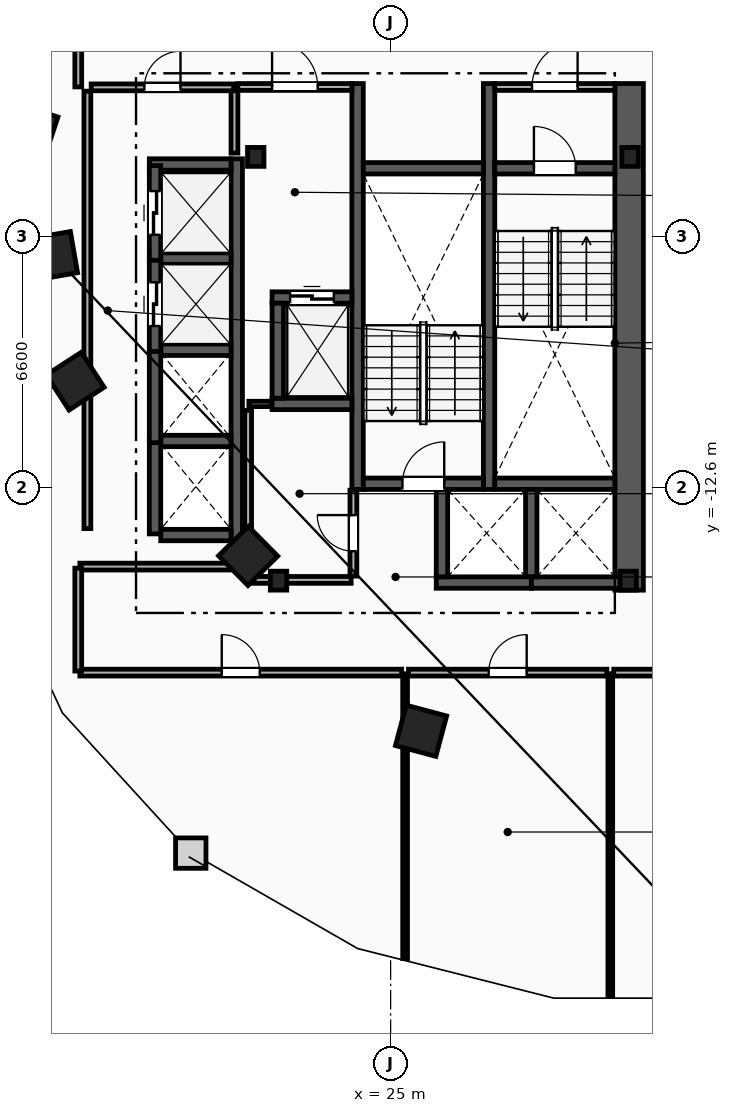
"""IFC4 building model, lengths in metres.
Left out: names, types, materials, properties, quantities, classifications, styles, units other than length and angle.
Written with IfcOpenShell. Run it as: python <this file> out.ifc"""

import sys

from ifc_helpers import new_model, si_unit, direction, frame, frame_2d, origin, origin_2d, place, context, subcontext, project, spatial, rectangle, i_section, extrude, element, fill, save


model = new_model("IFC4")
c1 = context("Model", 3, precision=1e-05, world=origin(), true_north=direction((0.0, 1.0)))
c2 = subcontext(c1, "Body", "Model", "MODEL_VIEW")
j1 = project(units=[si_unit("LENGTHUNIT", "METRE"), si_unit("PLANEANGLEUNIT", "RADIAN")], contexts=[c1])
p1 = place(None, origin())
s1 = spatial("IfcSite", under=j1, at=p1, CompositionType="ELEMENT")
p2 = place(p1, origin())
s2 = spatial("IfcBuilding", under=s1, at=p2, CompositionType="ELEMENT")
p3 = place(p2, frame((0.0, 0.0, 128.6)))
s3 = spatial("IfcBuildingStorey", under=s2, at=p3, CompositionType="ELEMENT", Elevation=128.6)
for number, where, z_axis, x_axis in (
    (1, (31.3, -3.9, 0.0), (0.0, 0.0, 1.0), (1.0, 0.0, 0.0)),
    (2, (21.45, -3.9, 0.0), (0.0, 0.0, 1.0), (1.0, 0.0, 0.0)),
    (3, (22.05, -15.05, 0.0), (0.0, 0.0, 1.0), (1.0, 0.0, 0.0)),
    (4, (31.25, -15.05, 0.0), (0.0, 0.0, 1.0), (1.0, 0.0, 0.0)),
):
    element("IfcColumn", number, at=place(p3, frame(where, z_axis=z_axis, x_axis=x_axis)), inside=s3, PredefinedType="COLUMN", context=c2, shape_type="SweptSolid", body=[
        extrude(i_section(OverallWidth=0.432, OverallDepth=0.498, WebThickness=0.056, FlangeThickness=0.089, FilletRadius=0.018, at=origin_2d()), origin(), (0.0, 0.0, 1.0), 3.6),
    ])
for number, where, z_axis, x_axis in (
    (5, (15.55, -3.2, 0.0), (0.0, 0.0, 1.0), (-0.315, -0.949, 0.0)),
    (6, (16.125, -6.5, 0.0), (0.0, 0.0, 1.0), (0.172, -0.985, 0.0)),
    (7, (16.7, -9.8, 0.0), (0.0, 0.0, 1.0), (0.544, -0.839, 0.0)),
    (8, (21.25, -14.4, 0.0), (0.0, 0.0, 1.0), (0.703, -0.711, 0.0)),
    (9, (25.8, -19.0, 0.0), (0.0, 0.0, 1.0), (0.966, -0.259, 0.0)),
):
    element("IfcColumn", number, at=place(p3, frame(where, z_axis=z_axis, x_axis=x_axis)), inside=s3, PredefinedType="COLUMN", context=c2, shape_type="SweptSolid", body=[
        extrude(rectangle(XDim=1.1, YDim=1.1, at=origin_2d()), origin(), (0.0, 0.0, 1.0), 3.6),
    ])
p4 = place(p3, frame((31.275, -15.3, 0.0), z_axis=(0.0, 0.0, 1.0), x_axis=(0.0, 1.0, 0.0)))
e10 = element("IfcWall", 10, at=p4, inside=s3, PredefinedType="SHEAR", context=c2, shape_type="SweptSolid", body=[
    extrude(rectangle(XDim=13.33, YDim=0.75, at=frame_2d((6.665, 0.0))), origin(), (0.0, 0.0, 1.0), 3.32),
])
for number, where, z_axis, x_axis in (
    (11, (27.59, -12.65, 0.0), (0.0, 0.0, 1.0), (0.0, 1.0, 0.0)),
    (12, (24.13, -12.65, 0.0), (0.0, 0.0, 1.0), (0.0, 1.0, 0.0)),
):
    element("IfcWall", number, at=place(p3, frame(where, z_axis=z_axis, x_axis=x_axis)), inside=s3, PredefinedType="SHEAR", context=c2, shape_type="SweptSolid", body=[
        extrude(rectangle(XDim=10.68, YDim=0.3, at=frame_2d((5.34, 0.0))), origin(), (0.0, 0.0, 1.0), 3.32),
    ])
p5 = place(p3, frame((27.74, -4.2, 0.0), z_axis=(0.0, 0.0, 1.0), x_axis=(1.0, 0.0, 0.0)))
e13 = element("IfcWall", 13, at=p5, inside=s3, PredefinedType="SHEAR", context=c2, shape_type="SweptSolid", body=[
    extrude(rectangle(XDim=3.16, YDim=0.3, at=frame_2d((1.58, 0.0))), origin(), (0.0, 0.0, 1.0), 3.32),
])
p6 = place(p5, frame((1.03, 0.0, 0.0)))
e14 = element("IfcOpeningElement", 14, at=p6, cuts=e13, PredefinedType="OPENING", context=c2, shape_type="SweptSolid", body=[
    extrude(rectangle(XDim=1.1, YDim=2.15, at=frame_2d((0.55, 1.075))), frame((0.0, 0.16, 0.0), z_axis=(0.0, -1.0, 0.0), x_axis=(1.0, 0.0, 0.0)), (0.0, 0.0, 1.0), 0.32),
])
p7 = place(p3, frame((27.74, -12.5, 0.0), z_axis=(0.0, 0.0, 1.0), x_axis=(1.0, 0.0, 0.0)))
e15 = element("IfcWall", 15, at=p7, inside=s3, PredefinedType="SHEAR", context=c2, shape_type="SweptSolid", body=[
    extrude(rectangle(XDim=3.16, YDim=0.3, at=frame_2d((1.58, 0.0))), origin(), (0.0, 0.0, 1.0), 3.32),
])
p8 = place(p3, frame((24.28, -12.5, 0.0), z_axis=(0.0, 0.0, 1.0), x_axis=(1.0, 0.0, 0.0)))
e16 = element("IfcWall", 16, at=p8, inside=s3, PredefinedType="SHEAR", context=c2, shape_type="SweptSolid", body=[
    extrude(rectangle(XDim=3.16, YDim=0.3, at=frame_2d((1.58, 0.0))), origin(), (0.0, 0.0, 1.0), 3.32),
])
p9 = place(p8, frame((1.03, 0.0, 0.0)))
e17 = element("IfcOpeningElement", 17, at=p9, cuts=e16, PredefinedType="OPENING", context=c2, shape_type="SweptSolid", body=[
    extrude(rectangle(XDim=1.1, YDim=2.15, at=frame_2d((0.55, 1.075))), frame((0.0, 0.16, 0.0), z_axis=(0.0, -1.0, 0.0), x_axis=(1.0, 0.0, 0.0)), (0.0, 0.0, 1.0), 0.32),
])
p10 = place(p3, frame((24.28, -4.2, 0.0), z_axis=(0.0, 0.0, 1.0), x_axis=(1.0, 0.0, 0.0)))
e18 = element("IfcWall", 18, at=p10, inside=s3, PredefinedType="SHEAR", context=c2, shape_type="SweptSolid", body=[
    extrude(rectangle(XDim=3.16, YDim=0.3, at=frame_2d((1.58, 0.0))), origin(), (0.0, 0.0, 1.0), 3.32),
])
p11 = place(p3, frame((20.89, -3.8, 0.0), z_axis=(0.0, 0.0, 1.0), x_axis=(0.0, 1.0, 0.0)))
e19 = element("IfcWall", 19, at=p11, inside=s3, PredefinedType="PARTITIONING", context=c2, shape_type="SweptSolid", body=[
    extrude(rectangle(XDim=1.65, YDim=0.18, at=frame_2d((0.825, 0.0))), origin(), (0.0, 0.0, 1.0), 3.32),
])
p12 = place(p3, frame((20.98, -2.06, 0.0), z_axis=(0.0, 0.0, 1.0), x_axis=(1.0, 0.0, 0.0)))
e20 = element("IfcWall", 20, at=p12, inside=s3, PredefinedType="PARTITIONING", context=c2, shape_type="SweptSolid", body=[
    extrude(rectangle(XDim=3.0, YDim=0.18, at=frame_2d((1.5, 0.0))), origin(), (0.0, 0.0, 1.0), 3.32),
])
p13 = place(p12, frame((0.9, 0.0, 0.0)))
e21 = element("IfcOpeningElement", 21, at=p13, cuts=e20, PredefinedType="OPENING", context=c2, shape_type="SweptSolid", body=[
    extrude(rectangle(XDim=1.2, YDim=2.15, at=frame_2d((0.6, 1.075))), frame((0.0, 0.1, 0.0), z_axis=(0.0, -1.0, 0.0), x_axis=(1.0, 0.0, 0.0)), (0.0, 0.0, 1.0), 0.2),
])
p14 = place(p3, frame((27.74, -2.06, 0.0), z_axis=(0.0, 0.0, 1.0), x_axis=(1.0, 0.0, 0.0)))
e22 = element("IfcWall", 22, at=p14, inside=s3, PredefinedType="PARTITIONING", context=c2, shape_type="SweptSolid", body=[
    extrude(rectangle(XDim=3.16, YDim=0.18, at=frame_2d((1.58, 0.0))), origin(), (0.0, 0.0, 1.0), 3.32),
])
p15 = place(p14, frame((0.98, 0.0, 0.0)))
e23 = element("IfcOpeningElement", 23, at=p15, cuts=e22, PredefinedType="OPENING", context=c2, shape_type="SweptSolid", body=[
    extrude(rectangle(XDim=1.2, YDim=2.15, at=frame_2d((0.6, 1.075))), frame((0.0, 0.1, 0.0), z_axis=(0.0, -1.0, 0.0), x_axis=(1.0, 0.0, 0.0)), (0.0, 0.0, 1.0), 0.2),
])
p16 = place(p3, frame((21.88, -7.6, 0.0), z_axis=(0.0, 0.0, 1.0), x_axis=(1.0, 0.0, 0.0)))
e24 = element("IfcWall", 24, at=p16, inside=s3, PredefinedType="SHEAR", context=c2, shape_type="SweptSolid", body=[
    extrude(rectangle(XDim=2.1, YDim=0.3, at=frame_2d((1.05, 0.0))), origin(), (0.0, 0.0, 1.0), 3.32),
])
p17 = place(p16, frame((0.475, 0.0, 0.0)))
e25 = element("IfcOpeningElement", 25, at=p17, cuts=e24, PredefinedType="OPENING", context=c2, shape_type="SweptSolid", body=[
    extrude(rectangle(XDim=1.15, YDim=2.2, at=frame_2d((0.575, 1.1))), frame((0.0, 0.16, 0.0), z_axis=(0.0, -1.0, 0.0), x_axis=(1.0, 0.0, 0.0)), (0.0, 0.0, 1.0), 0.32),
])
p18 = place(p3, frame((21.88, -10.4, 0.0), z_axis=(0.0, 0.0, 1.0), x_axis=(1.0, 0.0, 0.0)))
e26 = element("IfcWall", 26, at=p18, inside=s3, PredefinedType="SHEAR", context=c2, shape_type="SweptSolid", body=[
    extrude(rectangle(XDim=2.1, YDim=0.3, at=frame_2d((1.05, 0.0))), origin(), (0.0, 0.0, 1.0), 3.32),
])
for number, where, z_axis, x_axis in (
    (27, (22.03, -10.25, 0.0), (0.0, 0.0, 1.0), (0.0, 1.0, 0.0)),
    (28, (28.7, -15.1, 0.0), (0.0, 0.0, 1.0), (1.0, 0.0, 0.0)),
):
    element("IfcWall", number, at=place(p3, frame(where, z_axis=z_axis, x_axis=x_axis)), inside=s3, PredefinedType="SHEAR", context=c2, shape_type="SweptSolid", body=[
        extrude(rectangle(XDim=2.5, YDim=0.3, at=frame_2d((1.25, 0.0))), origin(), (0.0, 0.0, 1.0), 3.32),
    ])
p19 = place(p3, frame((28.7, -14.95, 0.0), z_axis=(0.0, 0.0, 1.0), x_axis=(0.0, 1.0, 0.0)))
e29 = element("IfcWall", 29, at=p19, inside=s3, PredefinedType="SHEAR", context=c2, shape_type="SweptSolid", body=[
    extrude(rectangle(XDim=2.3, YDim=0.3, at=frame_2d((1.15, 0.0))), origin(), (0.0, 0.0, 1.0), 3.32),
])
p20 = place(p3, frame((26.2, -15.1, 0.0), z_axis=(0.0, 0.0, 1.0), x_axis=(1.0, 0.0, 0.0)))
e30 = element("IfcWall", 30, at=p20, inside=s3, PredefinedType="SHEAR", context=c2, shape_type="SweptSolid", body=[
    extrude(rectangle(XDim=2.5, YDim=0.3, at=frame_2d((1.25, 0.0))), origin(), (0.0, 0.0, 1.0), 3.32),
])
p21 = place(p3, frame((26.35, -14.95, 0.0), z_axis=(0.0, 0.0, 1.0), x_axis=(0.0, 1.0, 0.0)))
e31 = element("IfcWall", 31, at=p21, inside=s3, PredefinedType="SHEAR", context=c2, shape_type="SweptSolid", body=[
    extrude(rectangle(XDim=2.3, YDim=0.3, at=frame_2d((1.15, 0.0))), origin(), (0.0, 0.0, 1.0), 3.32),
])
p22 = place(p3, frame((20.95, -14.0, 0.0), z_axis=(0.0, 0.0, 1.0), x_axis=(0.0, 1.0, 0.0)))
e32 = element("IfcWall", 32, at=p22, inside=s3, PredefinedType="SHEAR", context=c2, shape_type="SweptSolid", body=[
    extrude(rectangle(XDim=10.05, YDim=0.3, at=frame_2d((5.025, 0.0))), origin(), (0.0, 0.0, 1.0), 3.32),
])
p23 = place(p3, frame((18.95, -13.85, 0.0), z_axis=(0.0, 0.0, 1.0), x_axis=(1.0, 0.0, 0.0)))
e33 = element("IfcWall", 33, at=p23, inside=s3, PredefinedType="SHEAR", context=c2, shape_type="SweptSolid", body=[
    extrude(rectangle(XDim=1.85, YDim=0.3, at=frame_2d((0.925, 0.0))), origin(), (0.0, 0.0, 1.0), 3.32),
])
p24 = place(p3, frame((18.65, -4.1, 0.0), z_axis=(0.0, 0.0, 1.0), x_axis=(1.0, 0.0, 0.0)))
e34 = element("IfcWall", 34, at=p24, inside=s3, PredefinedType="SHEAR", context=c2, shape_type="SweptSolid", body=[
    extrude(rectangle(XDim=2.15, YDim=0.3, at=frame_2d((1.075, 0.0))), origin(), (0.0, 0.0, 1.0), 3.32),
])
for number, where, z_axis, x_axis in (
    (35, (18.95, -11.375, 0.0), (0.0, 0.0, 1.0), (1.0, 0.0, 0.0)),
    (36, (18.95, -8.975, 0.0), (0.0, 0.0, 1.0), (1.0, 0.0, 0.0)),
    (37, (18.95, -6.575, 0.0), (0.0, 0.0, 1.0), (1.0, 0.0, 0.0)),
):
    element("IfcWall", number, at=place(p3, frame(where, z_axis=z_axis, x_axis=x_axis)), inside=s3, PredefinedType="SHEAR", context=c2, shape_type="SweptSolid", body=[
        extrude(rectangle(XDim=1.85, YDim=0.3, at=frame_2d((0.925, 0.0))), origin(), (0.0, 0.0, 1.0), 3.32),
    ])
for number, where, z_axis, x_axis in (
    (38, (18.8, -13.82, 0.0), (0.0, 0.0, 1.0), (0.0, 1.0, 0.0)),
    (39, (18.8, -11.42, 0.0), (0.0, 0.0, 1.0), (0.0, 1.0, 0.0)),
):
    element("IfcWall", number, at=place(p3, frame(where, z_axis=z_axis, x_axis=x_axis)), inside=s3, PredefinedType="SHEAR", context=c2, shape_type="SweptSolid", body=[
        extrude(rectangle(XDim=2.49, YDim=0.3, at=frame_2d((1.245, 0.0))), origin(), (0.0, 0.0, 1.0), 3.32),
    ])
p25 = place(p3, frame((18.8, -9.02, 0.0), z_axis=(0.0, 0.0, 1.0), x_axis=(0.0, 1.0, 0.0)))
e40 = element("IfcWall", 40, at=p25, inside=s3, PredefinedType="SHEAR", context=c2, shape_type="SweptSolid", body=[
    extrude(rectangle(XDim=2.49, YDim=0.3, at=frame_2d((1.245, 0.0))), origin(), (0.0, 0.0, 1.0), 3.32),
])
p26 = place(p25, frame((0.67, 0.0, 0.0)))
e41 = element("IfcOpeningElement", 41, at=p26, cuts=e40, PredefinedType="OPENING", context=c2, shape_type="SweptSolid", body=[
    extrude(rectangle(XDim=1.15, YDim=2.2, at=frame_2d((0.575, 1.1))), frame((0.0, 0.16, 0.0), z_axis=(0.0, -1.0, 0.0), x_axis=(1.0, 0.0, 0.0)), (0.0, 0.0, 1.0), 0.32),
])
p27 = place(p3, frame((18.8, -6.62, 0.0), z_axis=(0.0, 0.0, 1.0), x_axis=(0.0, 1.0, 0.0)))
e42 = element("IfcWall", 42, at=p27, inside=s3, PredefinedType="SHEAR", context=c2, shape_type="SweptSolid", body=[
    extrude(rectangle(XDim=2.49, YDim=0.3, at=frame_2d((1.245, 0.0))), origin(), (0.0, 0.0, 1.0), 3.32),
])
p28 = place(p27, frame((0.67, 0.0, 0.0)))
e43 = element("IfcOpeningElement", 43, at=p28, cuts=e42, PredefinedType="OPENING", context=c2, shape_type="SweptSolid", body=[
    extrude(rectangle(XDim=1.15, YDim=2.2, at=frame_2d((0.575, 1.1))), frame((0.0, 0.16, 0.0), z_axis=(0.0, -1.0, 0.0), x_axis=(1.0, 0.0, 0.0)), (0.0, 0.0, 1.0), 0.32),
])
p29 = place(p3, frame((17.02, -13.68, 0.0), z_axis=(0.0, 0.0, 1.0), x_axis=(0.0, 1.0, 0.0)))
e44 = element("IfcWall", 44, at=p29, inside=s3, PredefinedType="PARTITIONING", context=c2, shape_type="SweptSolid", body=[
    extrude(rectangle(XDim=11.51, YDim=0.18, at=frame_2d((5.755, 0.0))), origin(), (0.0, 0.0, 1.0), 3.32),
])
p30 = place(p3, frame((17.12, -2.07, 0.0), z_axis=(0.0, 0.0, 1.0), x_axis=(1.0, 0.0, 0.0)))
e45 = element("IfcWall", 45, at=p30, inside=s3, PredefinedType="PARTITIONING", context=c2, shape_type="SweptSolid", body=[
    extrude(rectangle(XDim=3.75, YDim=0.18, at=frame_2d((1.875, 0.0))), origin(), (0.0, 0.0, 1.0), 3.32),
])
p31 = place(p30, frame((1.4, 0.0, 0.0)))
e46 = element("IfcOpeningElement", 46, at=p31, cuts=e45, PredefinedType="OPENING", context=c2, shape_type="SweptSolid", body=[
    extrude(rectangle(XDim=0.95, YDim=2.1, at=frame_2d((0.475, 1.05))), frame((0.0, 0.1, 0.0), z_axis=(0.0, -1.0, 0.0), x_axis=(1.0, 0.0, 0.0)), (0.0, 0.0, 1.0), 0.2),
])
p32 = place(p3, frame((21.27, -10.4, 0.0), z_axis=(0.0, 0.0, 1.0), x_axis=(1.0, 0.0, 0.0)))
e47 = element("IfcWall", 47, at=p32, inside=s3, PredefinedType="PARTITIONING", context=c2, shape_type="SweptSolid", body=[
    extrude(rectangle(XDim=0.59, YDim=0.14, at=frame_2d((0.295, 0.0))), origin(), (0.0, 0.0, 1.0), 3.32),
])
p33 = place(p3, frame((21.25, -14.93, 0.0), z_axis=(0.0, 0.0, 1.0), x_axis=(0.0, 1.0, 0.0)))
e48 = element("IfcWall", 48, at=p33, inside=s3, PredefinedType="PARTITIONING", context=c2, shape_type="SweptSolid", body=[
    extrude(rectangle(XDim=4.36, YDim=0.18, at=frame_2d((2.18, 0.0))), origin(), (0.0, 0.0, 1.0), 3.32),
])
p34 = place(p3, frame((21.35, -15.03, 0.0), z_axis=(0.0, 0.0, 1.0), x_axis=(1.0, 0.0, 0.0)))
e49 = element("IfcWall", 49, at=p34, inside=s3, PredefinedType="PARTITIONING", context=c2, shape_type="SweptSolid", body=[
    extrude(rectangle(XDim=2.61, YDim=0.18, at=frame_2d((1.305, 0.0))), origin(), (0.0, 0.0, 1.0), 2.393),
])
p35 = place(p3, frame((24.02, -14.93, 0.0), z_axis=(0.0, 0.0, 1.0), x_axis=(0.0, 1.0, 0.0)))
e50 = element("IfcWall", 50, at=p35, inside=s3, PredefinedType="PARTITIONING", context=c2, shape_type="SweptSolid", body=[
    extrude(rectangle(XDim=2.26, YDim=0.18, at=frame_2d((1.13, 0.0))), origin(), (0.0, 0.0, 1.0), 3.32),
])
p36 = place(p35, frame((0.655, 0.0, 0.0)))
e51 = element("IfcOpeningElement", 51, at=p36, cuts=e50, PredefinedType="OPENING", context=c2, shape_type="SweptSolid", body=[
    extrude(rectangle(XDim=0.95, YDim=2.1, at=frame_2d((0.475, 1.05))), frame((0.0, 0.1, 0.0), z_axis=(0.0, -1.0, 0.0), x_axis=(1.0, 0.0, 0.0)), (0.0, 0.0, 1.0), 0.2),
])
p37 = place(p3, frame((25.38, -24.995, 0.0), z_axis=(0.0, 0.0, 1.0), x_axis=(0.0, 1.0, 0.0)))
e52 = element("IfcWall", 52, at=p37, inside=s3, PredefinedType="PARTITIONING", context=c2, shape_type="SweptSolid", body=[
    extrude(rectangle(XDim=7.495, YDim=0.125, at=frame_2d((3.747, 0.0))), origin(), (0.0, 0.0, 1.0), 3.32),
])
p38 = place(p3, frame((30.78, -25.985, 0.0), z_axis=(0.0, 0.0, 1.0), x_axis=(0.0, 1.0, 0.0)))
e53 = element("IfcWall", 53, at=p38, inside=s3, PredefinedType="PARTITIONING", context=c2, shape_type="SweptSolid", body=[
    extrude(rectangle(XDim=8.485, YDim=0.125, at=frame_2d((4.243, 0.0))), origin(), (0.0, 0.0, 1.0), 3.32),
])
p39 = place(p3, frame((25.47, -17.47, 0.0), z_axis=(0.0, 0.0, 1.0), x_axis=(1.0, 0.0, 0.0)))
e54 = element("IfcWall", 54, at=p39, inside=s3, PredefinedType="PARTITIONING", context=c2, shape_type="SweptSolid", body=[
    extrude(rectangle(XDim=5.22, YDim=0.18, at=frame_2d((2.61, 0.0))), origin(), (0.0, 0.0, 1.0), 3.32),
])
p40 = place(p39, frame((2.11, 0.0, 0.0)))
e55 = element("IfcOpeningElement", 55, at=p40, cuts=e54, PredefinedType="OPENING", context=c2, shape_type="SweptSolid", body=[
    extrude(rectangle(XDim=1.0, YDim=2.15, at=frame_2d((0.5, 1.075))), frame((0.0, 0.1, 0.0), z_axis=(0.0, -1.0, 0.0), x_axis=(1.0, 0.0, 0.0)), (0.0, 0.0, 1.0), 0.2),
])
p41 = place(p3, frame((16.822, -17.47, 0.0), z_axis=(0.0, 0.0, 1.0), x_axis=(1.0, 0.0, 0.0)))
e56 = element("IfcWall", 56, at=p41, inside=s3, PredefinedType="PARTITIONING", context=c2, shape_type="SweptSolid", body=[
    extrude(rectangle(XDim=8.469, YDim=0.18, at=frame_2d((4.234, 0.0))), origin(), (0.0, 0.0, 1.0), 3.32),
])
p42 = place(p41, frame((3.734, 0.0, 0.0)))
e57 = element("IfcOpeningElement", 57, at=p42, cuts=e56, PredefinedType="OPENING", context=c2, shape_type="SweptSolid", body=[
    extrude(rectangle(XDim=1.0, YDim=2.15, at=frame_2d((0.5, 1.075))), frame((0.0, 0.1, 0.0), z_axis=(0.0, -1.0, 0.0), x_axis=(1.0, 0.0, 0.0)), (0.0, 0.0, 1.0), 0.2),
])
p43 = place(p3, frame((21.178, -14.68, 0.0), z_axis=(0.0, 0.0, 1.0), x_axis=(-1.0, 0.0, 0.0)))
e58 = element("IfcWall", 58, at=p43, inside=s3, PredefinedType="PARTITIONING", context=c2, shape_type="SweptSolid", body=[
    extrude(rectangle(XDim=4.357, YDim=0.18, at=frame_2d((2.178, 0.0))), origin(), (0.0, 0.0, 1.0), 3.32),
])
p44 = place(p3, frame((16.78, -14.721, 0.0), z_axis=(0.0, 0.0, 1.0), x_axis=(0.0, -1.0, 0.0)))
e59 = element("IfcWall", 59, at=p44, inside=s3, PredefinedType="PARTITIONING", context=c2, shape_type="SweptSolid", body=[
    extrude(rectangle(XDim=2.707, YDim=0.18, at=frame_2d((1.354, 0.0))), origin(), (0.0, 0.0, 1.0), 3.32),
])
p45 = place(p3, frame((16.78, 0.329, 0.0), z_axis=(0.0, 0.0, 1.0), x_axis=(0.0, -1.0, 0.0)))
e60 = element("IfcWall", 60, at=p45, inside=s3, PredefinedType="PARTITIONING", context=c2, shape_type="SweptSolid", body=[
    extrude(rectangle(XDim=2.387, YDim=0.18, at=frame_2d((1.194, 0.0))), origin(), (0.0, 0.0, 1.0), 3.32),
])
p46 = place(p3, frame((30.87, -17.47, 0.0), z_axis=(0.0, 0.0, 1.0), x_axis=(1.0, 0.0, 0.0)))
e61 = element("IfcWall", 61, at=p46, inside=s3, PredefinedType="PARTITIONING", context=c2, shape_type="SweptSolid", body=[
    extrude(rectangle(XDim=2.758, YDim=0.18, at=frame_2d((1.379, 0.0))), origin(), (0.0, 0.0, 1.0), 3.32),
])
p47 = place(p6, origin())
e62 = element("IfcDoor", 62, at=p47, inside=s3, OperationType="SINGLE_SWING_LEFT", PredefinedType="DOOR", context=c2, shape_type="SweptSolid", body=[
    extrude(rectangle(XDim=1.1, YDim=2.15, at=frame_2d((0.55, 1.075))), frame((0.0, 0.025, 0.0), z_axis=(0.0, -1.0, 0.0), x_axis=(1.0, 0.0, 0.0)), (0.0, 0.0, 1.0), 0.05),
])
fill(e14, e62)
p48 = place(p9, origin())
e63 = element("IfcDoor", 63, at=p48, inside=s3, OperationType="SINGLE_SWING_RIGHT", PredefinedType="DOOR", context=c2, shape_type="SweptSolid", body=[
    extrude(rectangle(XDim=1.1, YDim=2.15, at=frame_2d((0.55, 1.075))), frame((0.0, 0.025, 0.0), z_axis=(0.0, -1.0, 0.0), x_axis=(1.0, 0.0, 0.0)), (0.0, 0.0, 1.0), 0.05),
])
fill(e17, e63)
p49 = place(p13, origin())
e64 = element("IfcDoor", 64, at=p49, inside=s3, OperationType="SINGLE_SWING_LEFT", PredefinedType="DOOR", context=c2, shape_type="SweptSolid", body=[
    extrude(rectangle(XDim=1.2, YDim=2.15, at=frame_2d((0.6, 1.075))), frame((0.0, 0.025, 0.0), z_axis=(0.0, -1.0, 0.0), x_axis=(1.0, 0.0, 0.0)), (0.0, 0.0, 1.0), 0.05),
])
fill(e21, e64)
p50 = place(p15, origin())
e65 = element("IfcDoor", 65, at=p50, inside=s3, OperationType="SINGLE_SWING_RIGHT", PredefinedType="DOOR", context=c2, shape_type="SweptSolid", body=[
    extrude(rectangle(XDim=1.2, YDim=2.15, at=frame_2d((0.6, 1.075))), frame((0.0, 0.025, 0.0), z_axis=(0.0, -1.0, 0.0), x_axis=(1.0, 0.0, 0.0)), (0.0, 0.0, 1.0), 0.05),
])
fill(e23, e65)
p51 = place(p17, origin())
e66 = element("IfcDoor", 66, at=p51, inside=s3, OperationType="SLIDING_TO_LEFT", PredefinedType="TRAPDOOR", context=c2, shape_type="SweptSolid", body=[
    extrude(rectangle(XDim=1.15, YDim=2.2, at=frame_2d((0.575, 1.1))), frame((0.0, 0.025, 0.0), z_axis=(0.0, -1.0, 0.0), x_axis=(1.0, 0.0, 0.0)), (0.0, 0.0, 1.0), 0.05),
])
fill(e25, e66)
p52 = place(p26, origin())
e67 = element("IfcDoor", 67, at=p52, inside=s3, OperationType="SLIDING_TO_LEFT", PredefinedType="TRAPDOOR", context=c2, shape_type="SweptSolid", body=[
    extrude(rectangle(XDim=1.15, YDim=2.2, at=frame_2d((0.575, 1.1))), frame((0.0, 0.025, 0.0), z_axis=(0.0, -1.0, 0.0), x_axis=(1.0, 0.0, 0.0)), (0.0, 0.0, 1.0), 0.05),
])
fill(e41, e67)
p53 = place(p28, origin())
e68 = element("IfcDoor", 68, at=p53, inside=s3, OperationType="SLIDING_TO_LEFT", PredefinedType="TRAPDOOR", context=c2, shape_type="SweptSolid", body=[
    extrude(rectangle(XDim=1.15, YDim=2.2, at=frame_2d((0.575, 1.1))), frame((0.0, 0.025, 0.0), z_axis=(0.0, -1.0, 0.0), x_axis=(1.0, 0.0, 0.0)), (0.0, 0.0, 1.0), 0.05),
])
fill(e43, e68)
p54 = place(p42, origin())
e69 = element("IfcDoor", 69, at=p54, inside=s3, OperationType="SINGLE_SWING_LEFT", PredefinedType="DOOR", context=c2, shape_type="SweptSolid", body=[
    extrude(rectangle(XDim=1.0, YDim=2.15, at=frame_2d((0.5, 1.075))), frame((0.0, 0.025, 0.0), z_axis=(0.0, -1.0, 0.0), x_axis=(1.0, 0.0, 0.0)), (0.0, 0.0, 1.0), 0.05),
])
fill(e57, e69)
p55 = place(p40, origin())
e70 = element("IfcDoor", 70, at=p55, inside=s3, OperationType="SINGLE_SWING_RIGHT", PredefinedType="DOOR", context=c2, shape_type="SweptSolid", body=[
    extrude(rectangle(XDim=1.0, YDim=2.15, at=frame_2d((0.5, 1.075))), frame((0.0, 0.025, 0.0), z_axis=(0.0, -1.0, 0.0), x_axis=(1.0, 0.0, 0.0)), (0.0, 0.0, 1.0), 0.05),
])
fill(e55, e70)
p56 = place(p31, origin())
e71 = element("IfcDoor", 71, at=p56, inside=s3, OperationType="SINGLE_SWING_RIGHT", PredefinedType="DOOR", context=c2, shape_type="SweptSolid", body=[
    extrude(rectangle(XDim=0.95, YDim=2.1, at=frame_2d((0.475, 1.05))), frame((0.0, 0.025, 0.0), z_axis=(0.0, -1.0, 0.0), x_axis=(1.0, 0.0, 0.0)), (0.0, 0.0, 1.0), 0.05),
])
fill(e46, e71)
p57 = place(p36, origin())
e72 = element("IfcDoor", 72, at=p57, inside=s3, OperationType="SINGLE_SWING_RIGHT", PredefinedType="DOOR", context=c2, shape_type="SweptSolid", body=[
    extrude(rectangle(XDim=0.95, YDim=2.1, at=frame_2d((0.475, 1.05))), frame((0.0, 0.025, 0.0), z_axis=(0.0, -1.0, 0.0), x_axis=(1.0, 0.0, 0.0)), (0.0, 0.0, 1.0), 0.05),
])
fill(e51, e72)
save(model, sys.argv[1])
